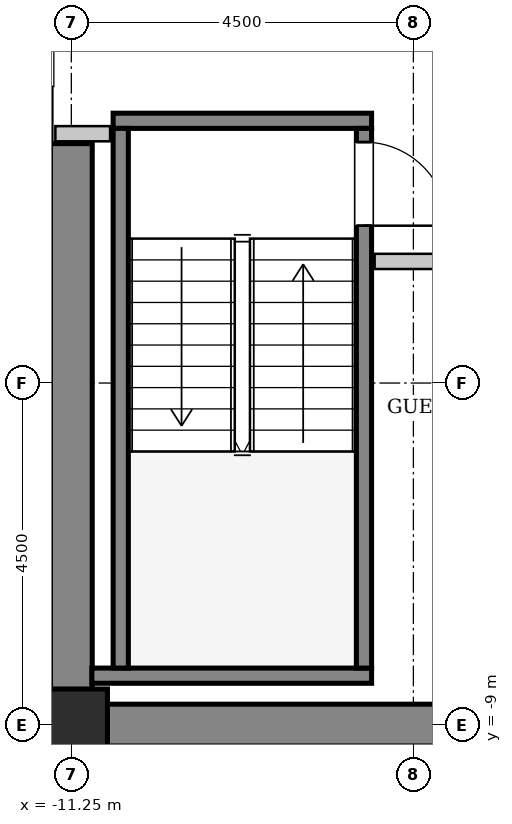
"""IFC4 building model, lengths in metres.
Left out: names, types, materials, properties, quantities, classifications, styles, units other than length and angle.
Written with IfcOpenShell. Run it as: python <this file> out.ifc"""

import sys

from ifc_helpers import new_model, si_unit, direction, frame, frame_2d, origin, origin_2d, place, context, subcontext, project, spatial, rectangle, hollow_rectangle, extrude, source, transform, mapped, element, fill, save


model = new_model("IFC4")
c1 = context("Model", 3, precision=1e-05, world=origin(), true_north=direction((0.0, 1.0)))
c2 = subcontext(c1, "Body", "Model", "MODEL_VIEW")
j1 = project(units=[si_unit("LENGTHUNIT", "METRE"), si_unit("PLANEANGLEUNIT", "RADIAN")], contexts=[c1])
p1 = place(None, origin())
s1 = spatial("IfcSite", under=j1, at=p1, CompositionType="ELEMENT")
p2 = place(p1, origin())
s2 = spatial("IfcBuilding", under=s1, at=p2, CompositionType="ELEMENT")
p3 = place(p2, frame((0.0, 0.0, 171.6)))
s3 = spatial("IfcBuildingStorey", under=s2, at=p3, CompositionType="ELEMENT", Elevation=171.6)
m1 = source(origin(), c2, "Body", "SweptSolid", [
    extrude(rectangle(XDim=9.975, YDim=0.55, at=frame_2d((4.987, 0.0))), origin(), (0.0, 0.0, 1.0), 3.8),
])
p4 = place(p3, frame((-11.525, -9.0, 0.0), z_axis=(0.0, 0.0, 1.0), x_axis=(1.0, 0.0, 0.0)))
e1 = element("IfcWall", 1, at=p4, inside=s3, PredefinedType="SHEAR", context=c2, shape_type="MappedRepresentation", body=[
    mapped(m1, transform((0.0, 0.0, 0.0), x_axis=(1.0, 0.0, 0.0), y_axis=(0.0, 1.0, 0.0), z_axis=(0.0, 0.0, 1.0), scale=1.0)),
])
m2 = source(origin(), c2, "Body", "SweptSolid", [
    extrude(rectangle(XDim=7.375, YDim=0.55, at=frame_2d((3.688, 0.0))), origin(), (0.0, 0.0, 1.0), 3.8),
])
p5 = place(p3, frame((-11.25, -8.725, 0.0), z_axis=(0.0, 0.0, 1.0), x_axis=(0.0, 1.0, 0.0)))
e2 = element("IfcWall", 2, at=p5, inside=s3, PredefinedType="SHEAR", context=c2, shape_type="MappedRepresentation", body=[
    mapped(m2, transform((0.0, 0.0, 0.0), x_axis=(1.0, 0.0, 0.0), y_axis=(0.0, 1.0, 0.0), z_axis=(0.0, 0.0, 1.0), scale=1.0)),
])
m3 = source(origin(), c2, "Body", "SweptSolid", [
    extrude(hollow_rectangle(XDim=0.95, YDim=0.95, WallThickness=0.045, InnerFilletRadius=0.045, OuterFilletRadius=0.09, at=origin_2d()), origin(), (0.0, 0.0, 1.0), 3.8),
])
p6 = place(p3, frame((-11.25, -9.0, 0.0), z_axis=(0.0, 0.0, 1.0), x_axis=(1.0, 0.0, 0.0)))
e3 = element("IfcColumn", 3, at=p6, inside=s3, PredefinedType="COLUMN", context=c2, shape_type="MappedRepresentation", body=[
    mapped(m3, transform((0.0, 0.0, 0.0), x_axis=(1.0, 0.0, 0.0), y_axis=(0.0, 1.0, 0.0), z_axis=(0.0, 0.0, 1.0), scale=1.0)),
])
m4 = source(origin(), c2, "Body", "SweptSolid", [
    extrude(rectangle(XDim=3.4, YDim=0.2, at=frame_2d((1.7, 0.0))), origin(), (0.0, 0.0, 1.0), 3.8),
])
p7 = place(p3, frame((-10.7, -1.05, 0.0), z_axis=(0.0, 0.0, 1.0), x_axis=(1.0, 0.0, 0.0)))
e4 = element("IfcWall", 4, at=p7, inside=s3, PredefinedType="SOLIDWALL", context=c2, shape_type="MappedRepresentation", body=[
    mapped(m4, transform((0.0, 0.0, 0.0), x_axis=(1.0, 0.0, 0.0), y_axis=(0.0, 1.0, 0.0), z_axis=(0.0, 0.0, 1.0), scale=1.0)),
])
m5 = source(origin(), c2, "Body", "SweptSolid", [
    extrude(rectangle(XDim=3.68, YDim=0.2, at=frame_2d((1.84, 0.0))), origin(), (0.0, 0.0, 1.0), 3.8),
])
p8 = place(p3, frame((-10.98, -8.35, 0.0), z_axis=(0.0, 0.0, 1.0), x_axis=(1.0, 0.0, 0.0)))
e5 = element("IfcWall", 5, at=p8, inside=s3, PredefinedType="SOLIDWALL", context=c2, shape_type="MappedRepresentation", body=[
    mapped(m5, transform((0.0, 0.0, 0.0), x_axis=(1.0, 0.0, 0.0), y_axis=(0.0, 1.0, 0.0), z_axis=(0.0, 0.0, 1.0), scale=1.0)),
])
m6 = source(origin(), c2, "Body", "SweptSolid", [
    extrude(rectangle(XDim=7.1, YDim=0.2, at=frame_2d((3.55, 0.0))), origin(), (0.0, 0.0, 1.0), 3.8),
])
p9 = place(p3, frame((-10.6, -1.15, 0.0), z_axis=(0.0, 0.0, 1.0), x_axis=(0.0, -1.0, 0.0)))
e6 = element("IfcWall", 6, at=p9, inside=s3, PredefinedType="SOLIDWALL", context=c2, shape_type="MappedRepresentation", body=[
    mapped(m6, transform((0.0, 0.0, 0.0), x_axis=(1.0, 0.0, 0.0), y_axis=(0.0, 1.0, 0.0), z_axis=(0.0, 0.0, 1.0), scale=1.0)),
])
p10 = place(p3, frame((-7.4, -1.15, 0.0), z_axis=(0.0, 0.0, 1.0), x_axis=(0.0, -1.0, 0.0)))
e7 = element("IfcWall", 7, at=p10, inside=s3, PredefinedType="SOLIDWALL", context=c2, shape_type="MappedRepresentation", body=[
    mapped(m6, transform((0.0, 0.0, 0.0), x_axis=(1.0, 0.0, 0.0), y_axis=(0.0, 1.0, 0.0), z_axis=(0.0, 0.0, 1.0), scale=1.0)),
])
p11 = place(p10, frame((0.18, 0.0, 0.0)))
e8 = element("IfcOpeningElement", 8, at=p11, cuts=e7, PredefinedType="OPENING", context=c2, shape_type="SweptSolid", body=[
    extrude(rectangle(XDim=1.1, YDim=2.15, at=frame_2d((0.55, 1.075))), frame((0.0, 0.11, 0.0), z_axis=(0.0, -1.0, 0.0), x_axis=(1.0, 0.0, 0.0)), (0.0, 0.0, 1.0), 0.22),
])
m7 = source(origin(), c2, "Body", "SweptSolid", [
    extrude(rectangle(XDim=2.9, YDim=0.2, at=frame_2d((1.45, 0.0))), origin(), (0.0, 0.0, 1.0), 3.535),
])
p12 = place(p3, frame((-7.26, -2.9, 0.0), z_axis=(0.0, 0.0, 1.0), x_axis=(1.0, 0.0, 0.0)))
e9 = element("IfcWall", 9, at=p12, inside=s3, PredefinedType="PARTITIONING", context=c2, shape_type="MappedRepresentation", body=[
    mapped(m7, transform((0.0, 0.0, 0.0), x_axis=(1.0, 0.0, 0.0), y_axis=(0.0, 1.0, 0.0), z_axis=(0.0, 0.0, 1.0), scale=1.0)),
])
m8 = source(origin(), c2, "Body", "SweptSolid", [
    extrude(rectangle(XDim=0.72, YDim=0.2, at=frame_2d((0.36, 0.0))), origin(), (0.0, 0.0, 1.0), 3.535),
])
p13 = place(p3, frame((-11.46, -1.22, 0.0), z_axis=(0.0, 0.0, 1.0), x_axis=(1.0, 0.0, 0.0)))
e10 = element("IfcWall", 10, at=p13, inside=s3, PredefinedType="PARTITIONING", context=c2, shape_type="MappedRepresentation", body=[
    mapped(m8, transform((0.0, 0.0, 0.0), x_axis=(1.0, 0.0, 0.0), y_axis=(0.0, 1.0, 0.0), z_axis=(0.0, 0.0, 1.0), scale=1.0)),
])
m9 = source(origin(), c2, "Body", "SweptSolid", [
    extrude(rectangle(XDim=1.1, YDim=2.15, at=frame_2d((0.55, 1.075))), frame((0.0, 0.025, 0.0), z_axis=(0.0, -1.0, 0.0), x_axis=(1.0, 0.0, 0.0)), (0.0, 0.0, 1.0), 0.05),
])
p14 = place(p11, origin())
e11 = element("IfcDoor", 11, at=p14, inside=s3, OperationType="SINGLE_SWING_RIGHT", PredefinedType="DOOR", context=c2, shape_type="MappedRepresentation", body=[
    mapped(m9, transform((0.0, 0.0, 0.0), x_axis=(1.0, 0.0, 0.0), y_axis=(0.0, 1.0, 0.0), z_axis=(0.0, 0.0, 1.0), scale=1.0)),
])
fill(e8, e11)
save(model, sys.argv[1])
